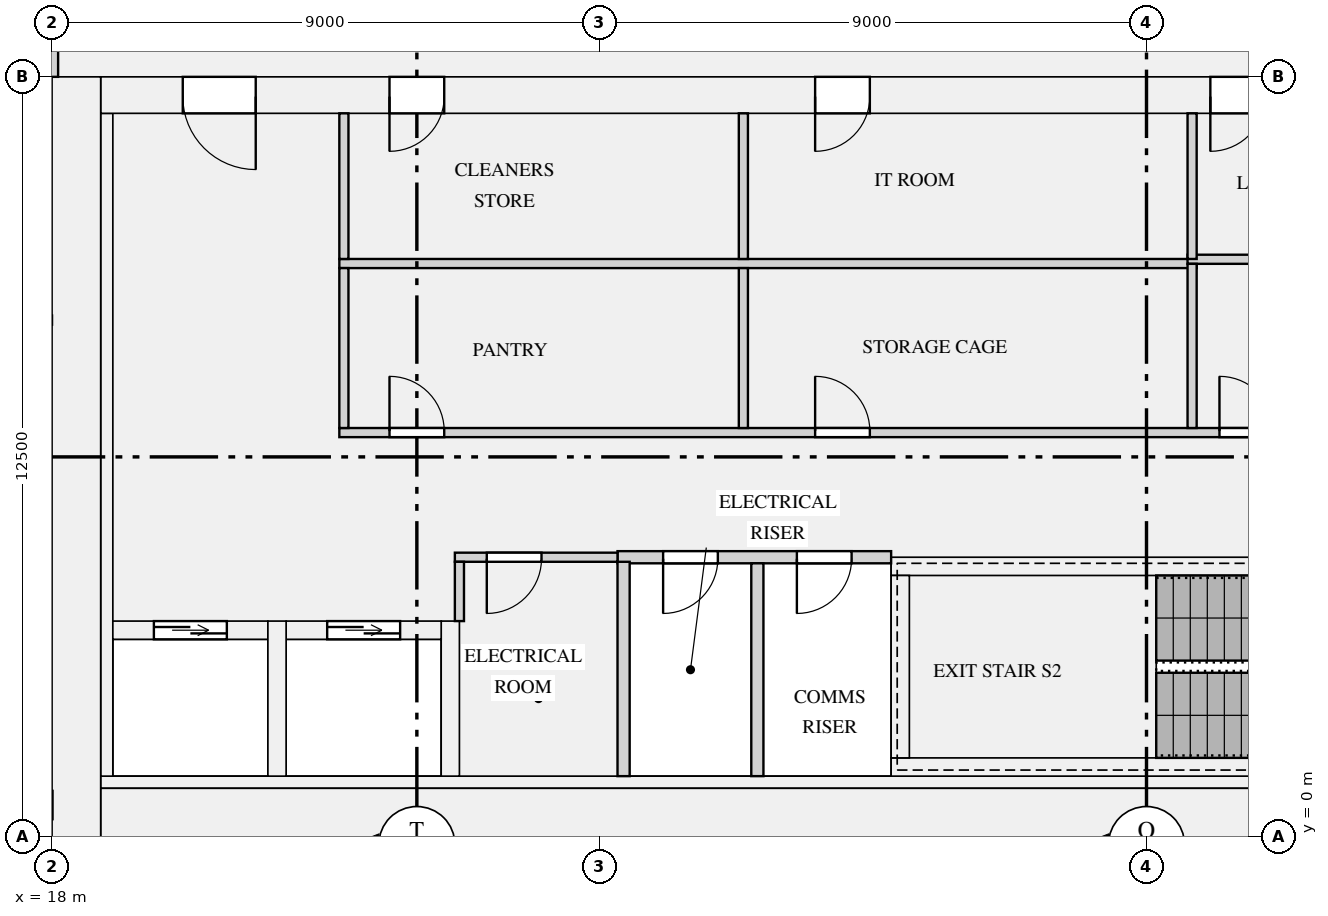
"""IFC4 building model, lengths in metres.
Left out: names, types, materials, properties, quantities, classifications, styles, units other than length and angle.
Written with IfcOpenShell. Run it as: python <this file> out.ifc"""

import sys

from ifc_helpers import new_model, si_unit, direction, frame, frame_2d, origin, place, context, subcontext, project, spatial, rectangle, extrude, element, fill, save


model = new_model("IFC4")
c1 = context("Model", 3, precision=1e-05, world=origin(), true_north=direction((0.0, 1.0)))
c2 = subcontext(c1, "Body", "Model", "MODEL_VIEW")
j1 = project(units=[si_unit("LENGTHUNIT", "METRE"), si_unit("PLANEANGLEUNIT", "RADIAN")], contexts=[c1])
p1 = place(None, origin())
s1 = spatial("IfcSite", under=j1, at=p1, CompositionType="ELEMENT")
p2 = place(p1, origin())
s2 = spatial("IfcBuilding", under=s1, at=p2, CompositionType="ELEMENT")
p3 = place(p2, frame((0.0, 0.0, 124.5)))
s3 = spatial("IfcBuildingStorey", under=s2, at=p3, CompositionType="ELEMENT", Elevation=124.5)
p4 = place(p3, frame((18.4, 0.0, 0.0), z_axis=(0.0, 0.0, 1.0), x_axis=(0.0, 1.0, 0.0)))
e1 = element("IfcWall", 1, at=p4, inside=s3, PredefinedType="SHEAR", context=c2, shape_type="SweptSolid", body=[
    extrude(rectangle(XDim=12.5, YDim=0.8, at=frame_2d((6.25, 0.0))), origin(), (0.0, 0.0, 1.0), 3.15),
])
p5 = place(p3, frame((18.8, 0.4, 0.0), z_axis=(0.0, 0.0, 1.0), x_axis=(1.0, 0.0, 0.0)))
e2 = element("IfcWall", 2, at=p5, inside=s3, PredefinedType="SHEAR", context=c2, shape_type="SweptSolid", body=[
    extrude(rectangle(XDim=34.4, YDim=0.8, at=frame_2d((17.2, 0.0))), origin(), (0.0, 0.0, 1.0), 3.15),
])
p6 = place(p3, frame((18.8, 12.2, 0.0), z_axis=(0.0, 0.0, 1.0), x_axis=(1.0, 0.0, 0.0)))
e3 = element("IfcWall", 3, at=p6, inside=s3, PredefinedType="SHEAR", context=c2, shape_type="SweptSolid", body=[
    extrude(rectangle(XDim=34.4, YDim=0.6, at=frame_2d((17.2, 0.0))), origin(), (0.0, 0.0, 1.0), 3.15),
])
p7 = place(p6, frame((24.375, 0.0, 0.0)))
e4 = element("IfcOpeningElement", 4, at=p7, cuts=e3, PredefinedType="OPENING", context=c2, shape_type="SweptSolid", body=[
    extrude(rectangle(XDim=1.1, YDim=2.1, at=frame_2d((0.55, 1.05))), frame((0.0, 0.31, 0.0), z_axis=(0.0, -1.0, 0.0), x_axis=(1.0, 0.0, 0.0)), (0.0, 0.0, 1.0), 0.62),
])
p8 = place(p6, frame((26.625, 0.0, 0.0)))
e5 = element("IfcOpeningElement", 5, at=p8, cuts=e3, PredefinedType="OPENING", context=c2, shape_type="SweptSolid", body=[
    extrude(rectangle(XDim=1.1, YDim=2.1, at=frame_2d((0.55, 1.05))), frame((0.0, 0.31, 0.0), z_axis=(0.0, -1.0, 0.0), x_axis=(1.0, 0.0, 0.0)), (0.0, 0.0, 1.0), 0.62),
])
p9 = place(p6, frame((28.875, 0.0, 0.0)))
e6 = element("IfcOpeningElement", 6, at=p9, cuts=e3, PredefinedType="OPENING", context=c2, shape_type="SweptSolid", body=[
    extrude(rectangle(XDim=1.1, YDim=2.1, at=frame_2d((0.55, 1.05))), frame((0.0, 0.31, 0.0), z_axis=(0.0, -1.0, 0.0), x_axis=(1.0, 0.0, 0.0)), (0.0, 0.0, 1.0), 0.62),
])
p10 = place(p6, frame((4.75, 0.0, 0.0)))
e7 = element("IfcOpeningElement", 7, at=p10, cuts=e3, PredefinedType="OPENING", context=c2, shape_type="SweptSolid", body=[
    extrude(rectangle(XDim=0.9, YDim=2.1, at=frame_2d((0.45, 1.05))), frame((0.0, 0.31, 0.0), z_axis=(0.0, -1.0, 0.0), x_axis=(1.0, 0.0, 0.0)), (0.0, 0.0, 1.0), 0.62),
])
p11 = place(p6, frame((11.75, 0.0, 0.0)))
e8 = element("IfcOpeningElement", 8, at=p11, cuts=e3, PredefinedType="OPENING", context=c2, shape_type="SweptSolid", body=[
    extrude(rectangle(XDim=0.9, YDim=2.1, at=frame_2d((0.45, 1.05))), frame((0.0, 0.31, 0.0), z_axis=(0.0, -1.0, 0.0), x_axis=(1.0, 0.0, 0.0)), (0.0, 0.0, 1.0), 0.62),
])
p12 = place(p6, frame((18.25, 0.0, 0.0)))
e9 = element("IfcOpeningElement", 9, at=p12, cuts=e3, PredefinedType="OPENING", context=c2, shape_type="SweptSolid", body=[
    extrude(rectangle(XDim=0.9, YDim=2.1, at=frame_2d((0.45, 1.05))), frame((0.0, 0.31, 0.0), z_axis=(0.0, -1.0, 0.0), x_axis=(1.0, 0.0, 0.0)), (0.0, 0.0, 1.0), 0.62),
])
p13 = place(p6, frame((1.35, 0.0, 0.0)))
e10 = element("IfcOpeningElement", 10, at=p13, cuts=e3, PredefinedType="OPENING", context=c2, shape_type="SweptSolid", body=[
    extrude(rectangle(XDim=1.2, YDim=2.1, at=frame_2d((0.6, 1.05))), frame((0.0, 0.31, 0.0), z_axis=(0.0, -1.0, 0.0), x_axis=(1.0, 0.0, 0.0)), (0.0, 0.0, 1.0), 0.62),
])
p14 = place(p6, frame((31.85, 0.0, 0.0)))
e11 = element("IfcOpeningElement", 11, at=p14, cuts=e3, PredefinedType="OPENING", context=c2, shape_type="SweptSolid", body=[
    extrude(rectangle(XDim=1.2, YDim=2.1, at=frame_2d((0.6, 1.05))), frame((0.0, 0.31, 0.0), z_axis=(0.0, -1.0, 0.0), x_axis=(1.0, 0.0, 0.0)), (0.0, 0.0, 1.0), 0.62),
])
p15 = place(p3, frame((18.9, 1.0, 0.0), z_axis=(0.0, 0.0, 1.0), x_axis=(0.0, 1.0, 0.0)))
e12 = element("IfcWall", 12, at=p15, inside=s3, PredefinedType="SHEAR", context=c2, shape_type="SweptSolid", body=[
    extrude(rectangle(XDim=10.9, YDim=0.2, at=frame_2d((5.45, 0.0))), origin(), (0.0, 0.0, 1.0), 3.15),
])
p16 = place(p3, frame((18.8, 0.9, 0.0), z_axis=(0.0, 0.0, 1.0), x_axis=(1.0, 0.0, 0.0)))
e13 = element("IfcWall", 13, at=p16, inside=s3, PredefinedType="SHEAR", context=c2, shape_type="SweptSolid", body=[
    extrude(rectangle(XDim=34.4, YDim=0.2, at=frame_2d((17.2, 0.0))), origin(), (0.0, 0.0, 1.0), 3.15),
])
p17 = place(p3, frame((19.0, 3.4, 0.0), z_axis=(0.0, 0.0, 1.0), x_axis=(1.0, 0.0, 0.0)))
e14 = element("IfcWall", 14, at=p17, inside=s3, PredefinedType="SHEAR", context=c2, shape_type="SweptSolid", body=[
    extrude(rectangle(XDim=2.55, YDim=0.3, at=frame_2d((1.275, 0.0))), origin(), (0.0, 0.0, 1.0), 3.15),
])
p18 = place(p17, frame((0.675, 0.0, 0.0)))
e15 = element("IfcOpeningElement", 15, at=p18, cuts=e14, PredefinedType="OPENING", context=c2, shape_type="SweptSolid", body=[
    extrude(rectangle(XDim=1.2, YDim=2.1, at=frame_2d((0.6, 1.05))), frame((0.0, 0.16, 0.0), z_axis=(0.0, -1.0, 0.0), x_axis=(1.0, 0.0, 0.0)), (0.0, 0.0, 1.0), 0.32),
])
p19 = place(p3, frame((21.85, 3.4, 0.0), z_axis=(0.0, 0.0, 1.0), x_axis=(1.0, 0.0, 0.0)))
e16 = element("IfcWall", 16, at=p19, inside=s3, PredefinedType="SHEAR", context=c2, shape_type="SweptSolid", body=[
    extrude(rectangle(XDim=2.55, YDim=0.3, at=frame_2d((1.275, 0.0))), origin(), (0.0, 0.0, 1.0), 3.15),
])
p20 = place(p19, frame((0.675, 0.0, 0.0)))
e17 = element("IfcOpeningElement", 17, at=p20, cuts=e16, PredefinedType="OPENING", context=c2, shape_type="SweptSolid", body=[
    extrude(rectangle(XDim=1.2, YDim=2.1, at=frame_2d((0.6, 1.05))), frame((0.0, 0.16, 0.0), z_axis=(0.0, -1.0, 0.0), x_axis=(1.0, 0.0, 0.0)), (0.0, 0.0, 1.0), 0.32),
])
for number, where, z_axis, x_axis in (
    (18, (21.7, 1.0, 0.0), (0.0, 0.0, 1.0), (0.0, 1.0, 0.0)),
    (19, (24.55, 1.0, 0.0), (0.0, 0.0, 1.0), (0.0, 1.0, 0.0)),
):
    element("IfcWall", number, at=place(p3, frame(where, z_axis=z_axis, x_axis=x_axis)), inside=s3, PredefinedType="SHEAR", context=c2, shape_type="SweptSolid", body=[
        extrude(rectangle(XDim=2.55, YDim=0.3, at=frame_2d((1.275, 0.0))), origin(), (0.0, 0.0, 1.0), 3.15),
    ])
p21 = place(p3, frame((31.8, 1.15, 0.0), z_axis=(0.0, 0.0, 1.0), x_axis=(1.0, 0.0, 0.0)))
e20 = element("IfcWall", 20, at=p21, inside=s3, PredefinedType="SHEAR", context=c2, shape_type="SweptSolid", body=[
    extrude(rectangle(XDim=8.4, YDim=0.3, at=frame_2d((4.2, 0.0))), origin(), (0.0, 0.0, 1.0), 3.15),
])
p22 = place(p3, frame((31.8, 4.45, 0.0), z_axis=(0.0, 0.0, 1.0), x_axis=(1.0, 0.0, 0.0)))
e21 = element("IfcWall", 21, at=p22, inside=s3, PredefinedType="SHEAR", context=c2, shape_type="SweptSolid", body=[
    extrude(rectangle(XDim=8.4, YDim=0.3, at=frame_2d((4.2, 0.0))), origin(), (0.0, 0.0, 1.0), 3.15),
])
p23 = place(p22, frame((6.8, 0.0, 0.0)))
e22 = element("IfcOpeningElement", 22, at=p23, cuts=e21, PredefinedType="OPENING", context=c2, shape_type="SweptSolid", body=[
    extrude(rectangle(XDim=1.1, YDim=2.1, at=frame_2d((0.55, 1.05))), frame((0.0, 0.16, 0.0), z_axis=(0.0, -1.0, 0.0), x_axis=(1.0, 0.0, 0.0)), (0.0, 0.0, 1.0), 0.32),
])
p24 = place(p3, frame((31.95, 1.3, 0.0), z_axis=(0.0, 0.0, 1.0), x_axis=(0.0, 1.0, 0.0)))
e23 = element("IfcWall", 23, at=p24, inside=s3, PredefinedType="SHEAR", context=c2, shape_type="SweptSolid", body=[
    extrude(rectangle(XDim=3.0, YDim=0.3, at=frame_2d((1.5, 0.0))), origin(), (0.0, 0.0, 1.0), 3.15),
])
p25 = place(p3, frame((14.05, 0.525, 0.9), z_axis=(0.0, 0.0, 1.0), x_axis=(1.0, 0.0, 0.0)))
e24 = element("IfcWall", 24, at=p25, inside=s3, PredefinedType="SOLIDWALL", context=c2, shape_type="SweptSolid", body=[
    extrude(rectangle(XDim=3.95, YDim=0.45, at=frame_2d((1.975, 0.0))), origin(), (0.0, 0.0, 1.0), 1.93),
])
p26 = place(p25, frame((1.225, 0.0, 0.15)))
e25 = element("IfcOpeningElement", 25, at=p26, cuts=e24, PredefinedType="OPENING", context=c2, shape_type="SweptSolid", body=[
    extrude(rectangle(XDim=1.5, YDim=1.5, at=frame_2d((0.75, 0.75))), frame((0.0, 0.235, 0.0), z_axis=(0.0, -1.0, 0.0), x_axis=(1.0, 0.0, 0.0)), (0.0, 0.0, 1.0), 0.47),
])
p27 = place(p3, frame((27.3, 4.6, 0.0), z_axis=(0.0, 0.0, 1.0), x_axis=(1.0, 0.0, 0.0)))
e26 = element("IfcWall", 26, at=p27, inside=s3, PredefinedType="PARTITIONING", context=c2, shape_type="SweptSolid", body=[
    extrude(rectangle(XDim=4.5, YDim=0.2, at=frame_2d((2.25, 0.0))), origin(), (0.0, 0.0, 1.0), 2.83),
])
p28 = place(p27, frame((0.75, 0.0, 0.0)))
e27 = element("IfcOpeningElement", 27, at=p28, cuts=e26, PredefinedType="OPENING", context=c2, shape_type="SweptSolid", body=[
    extrude(rectangle(XDim=0.9, YDim=2.1, at=frame_2d((0.45, 1.05))), frame((0.0, 0.11, 0.0), z_axis=(0.0, -1.0, 0.0), x_axis=(1.0, 0.0, 0.0)), (0.0, 0.0, 1.0), 0.22),
])
p29 = place(p27, frame((2.95, 0.0, 0.0)))
e28 = element("IfcOpeningElement", 28, at=p29, cuts=e26, PredefinedType="OPENING", context=c2, shape_type="SweptSolid", body=[
    extrude(rectangle(XDim=0.9, YDim=2.1, at=frame_2d((0.45, 1.05))), frame((0.0, 0.11, 0.0), z_axis=(0.0, -1.0, 0.0), x_axis=(1.0, 0.0, 0.0)), (0.0, 0.0, 1.0), 0.22),
])
p30 = place(p3, frame((24.625, 4.6, 0.0), z_axis=(0.0, 0.0, 1.0), x_axis=(1.0, 0.0, 0.0)))
e29 = element("IfcWall", 29, at=p30, inside=s3, PredefinedType="PARTITIONING", context=c2, shape_type="SweptSolid", body=[
    extrude(rectangle(XDim=2.675, YDim=0.15, at=frame_2d((1.337, 0.0))), origin(), (0.0, 0.0, 1.0), 2.83),
])
p31 = place(p30, frame((0.525, 0.0, 0.0)))
e30 = element("IfcOpeningElement", 30, at=p31, cuts=e29, PredefinedType="OPENING", context=c2, shape_type="SweptSolid", body=[
    extrude(rectangle(XDim=0.9, YDim=2.1, at=frame_2d((0.45, 1.05))), frame((0.0, 0.085, 0.0), z_axis=(0.0, -1.0, 0.0), x_axis=(1.0, 0.0, 0.0)), (0.0, 0.0, 1.0), 0.17),
])
p32 = place(p3, frame((22.725, 6.65, 0.0), z_axis=(0.0, 0.0, 1.0), x_axis=(1.0, 0.0, 0.0)))
e31 = element("IfcWall", 31, at=p32, inside=s3, PredefinedType="PARTITIONING", context=c2, shape_type="SweptSolid", body=[
    extrude(rectangle(XDim=19.8, YDim=0.15, at=frame_2d((9.9, 0.0))), origin(), (0.0, 0.0, 1.0), 2.83),
])
p33 = place(p32, frame((0.825, 0.0, 0.0)))
e32 = element("IfcOpeningElement", 32, at=p33, cuts=e31, PredefinedType="OPENING", context=c2, shape_type="SweptSolid", body=[
    extrude(rectangle(XDim=0.9, YDim=2.1, at=frame_2d((0.45, 1.05))), frame((0.0, 0.085, 0.0), z_axis=(0.0, -1.0, 0.0), x_axis=(1.0, 0.0, 0.0)), (0.0, 0.0, 1.0), 0.17),
])
p34 = place(p32, frame((7.825, 0.0, 0.0)))
e33 = element("IfcOpeningElement", 33, at=p34, cuts=e31, PredefinedType="OPENING", context=c2, shape_type="SweptSolid", body=[
    extrude(rectangle(XDim=0.9, YDim=2.1, at=frame_2d((0.45, 1.05))), frame((0.0, 0.085, 0.0), z_axis=(0.0, -1.0, 0.0), x_axis=(1.0, 0.0, 0.0)), (0.0, 0.0, 1.0), 0.17),
])
p35 = place(p32, frame((14.475, 0.0, 0.0)))
e34 = element("IfcOpeningElement", 34, at=p35, cuts=e31, PredefinedType="OPENING", context=c2, shape_type="SweptSolid", body=[
    extrude(rectangle(XDim=0.9, YDim=2.1, at=frame_2d((0.45, 1.05))), frame((0.0, 0.085, 0.0), z_axis=(0.0, -1.0, 0.0), x_axis=(1.0, 0.0, 0.0)), (0.0, 0.0, 1.0), 0.17),
])
p36 = place(p3, frame((22.725, 9.43, 0.0), z_axis=(0.0, 0.0, 1.0), x_axis=(1.0, 0.0, 0.0)))
e35 = element("IfcWall", 35, at=p36, inside=s3, PredefinedType="PARTITIONING", context=c2, shape_type="SweptSolid", body=[
    extrude(rectangle(XDim=14.1, YDim=0.15, at=frame_2d((7.05, 0.0))), origin(), (0.0, 0.0, 1.0), 2.83),
])
p37 = place(p3, frame((36.675, 9.5, 0.0), z_axis=(0.0, 0.0, 1.0), x_axis=(1.0, 0.0, 0.0)))
e36 = element("IfcWall", 36, at=p37, inside=s3, PredefinedType="PARTITIONING", context=c2, shape_type="SweptSolid", body=[
    extrude(rectangle(XDim=5.775, YDim=0.15, at=frame_2d((2.887, 0.0))), origin(), (0.0, 0.0, 1.0), 2.83),
])
p38 = place(p3, frame((27.4, 1.0, 0.0), z_axis=(0.0, 0.0, 1.0), x_axis=(0.0, 1.0, 0.0)))
e37 = element("IfcWall", 37, at=p38, inside=s3, PredefinedType="PARTITIONING", context=c2, shape_type="SweptSolid", body=[
    extrude(rectangle(XDim=3.525, YDim=0.2, at=frame_2d((1.762, 0.0))), origin(), (0.0, 0.0, 1.0), 2.83),
])
p39 = place(p3, frame((29.6, 1.0, 0.0), z_axis=(0.0, 0.0, 1.0), x_axis=(0.0, 1.0, 0.0)))
e38 = element("IfcWall", 38, at=p39, inside=s3, PredefinedType="PARTITIONING", context=c2, shape_type="SweptSolid", body=[
    extrude(rectangle(XDim=3.5, YDim=0.2, at=frame_2d((1.75, 0.0))), origin(), (0.0, 0.0, 1.0), 2.83),
])
p40 = place(p3, frame((24.7, 3.55, 0.0), z_axis=(0.0, 0.0, 1.0), x_axis=(0.0, 1.0, 0.0)))
e39 = element("IfcWall", 39, at=p40, inside=s3, PredefinedType="PARTITIONING", context=c2, shape_type="SweptSolid", body=[
    extrude(rectangle(XDim=0.975, YDim=0.15, at=frame_2d((0.487, 0.0))), origin(), (0.0, 0.0, 1.0), 2.83),
])
for number, where, z_axis, x_axis in (
    (40, (22.8, 6.725, 0.0), (0.0, 0.0, 1.0), (0.0, 1.0, 0.0)),
    (41, (29.37, 6.725, 0.0), (0.0, 0.0, 1.0), (0.0, 1.0, 0.0)),
):
    element("IfcWall", number, at=place(p3, frame(where, z_axis=z_axis, x_axis=x_axis)), inside=s3, PredefinedType="PARTITIONING", context=c2, shape_type="SweptSolid", body=[
        extrude(rectangle(XDim=2.63, YDim=0.15, at=frame_2d((1.315, 0.0))), origin(), (0.0, 0.0, 1.0), 2.83),
    ])
p41 = place(p3, frame((36.75, 6.725, 0.0), z_axis=(0.0, 0.0, 1.0), x_axis=(0.0, 1.0, 0.0)))
e42 = element("IfcWall", 42, at=p41, inside=s3, PredefinedType="PARTITIONING", context=c2, shape_type="SweptSolid", body=[
    extrude(rectangle(XDim=2.7, YDim=0.15, at=frame_2d((1.35, 0.0))), origin(), (0.0, 0.0, 1.0), 2.83),
])
for number, where, z_axis, x_axis in (
    (43, (22.8, 9.505, 0.0), (0.0, 0.0, 1.0), (0.0, 1.0, 0.0)),
    (44, (29.37, 9.505, 0.0), (0.0, 0.0, 1.0), (0.0, 1.0, 0.0)),
    (45, (36.75, 9.505, 0.0), (0.0, 0.0, 1.0), (0.0, 1.0, 0.0)),
):
    element("IfcWall", number, at=place(p3, frame(where, z_axis=z_axis, x_axis=x_axis)), inside=s3, PredefinedType="PARTITIONING", context=c2, shape_type="SweptSolid", body=[
        extrude(rectangle(XDim=2.395, YDim=0.15, at=frame_2d((1.198, 0.0))), origin(), (0.0, 0.0, 1.0), 2.83),
    ])
p42 = place(p3, frame((18.0, 12.5, 0.0), z_axis=(0.0, 0.0, 1.0), x_axis=(0.0, 1.0, 0.0)))
e46 = element("IfcWall", 46, at=p42, inside=s3, PredefinedType="PARTITIONING", context=c2, shape_type="SweptSolid", body=[
    extrude(rectangle(XDim=3.4, YDim=0.2, at=frame_2d((1.7, 0.0))), origin(), (0.0, 0.0, 1.0), 2.83),
])
p43 = place(p18, origin())
e47 = element("IfcDoor", 47, at=p43, inside=s3, OperationType="DOUBLE_DOOR_SLIDING", PredefinedType="DOOR", context=c2, shape_type="SweptSolid", body=[
    extrude(rectangle(XDim=1.2, YDim=2.1, at=frame_2d((0.6, 1.05))), frame((0.0, 0.025, 0.0), z_axis=(0.0, -1.0, 0.0), x_axis=(1.0, 0.0, 0.0)), (0.0, 0.0, 1.0), 0.05),
])
fill(e15, e47)
p44 = place(p20, origin())
e48 = element("IfcDoor", 48, at=p44, inside=s3, OperationType="DOUBLE_DOOR_SLIDING", PredefinedType="DOOR", context=c2, shape_type="SweptSolid", body=[
    extrude(rectangle(XDim=1.2, YDim=2.1, at=frame_2d((0.6, 1.05))), frame((0.0, 0.025, 0.0), z_axis=(0.0, -1.0, 0.0), x_axis=(1.0, 0.0, 0.0)), (0.0, 0.0, 1.0), 0.05),
])
fill(e17, e48)
p45 = place(p31, frame((0.9, 0.0, 0.0), z_axis=(0.0, 0.0, 1.0), x_axis=(-1.0, 0.0, 0.0)))
e49 = element("IfcDoor", 49, at=p45, inside=s3, OperationType="SINGLE_SWING_RIGHT", PredefinedType="DOOR", context=c2, shape_type="SweptSolid", body=[
    extrude(rectangle(XDim=0.9, YDim=2.1, at=frame_2d((0.45, 1.05))), frame((0.0, 0.025, 0.0), z_axis=(0.0, -1.0, 0.0), x_axis=(1.0, 0.0, 0.0)), (0.0, 0.0, 1.0), 0.05),
])
fill(e30, e49)
p46 = place(p33, origin())
e50 = element("IfcDoor", 50, at=p46, inside=s3, OperationType="SINGLE_SWING_LEFT", PredefinedType="DOOR", context=c2, shape_type="SweptSolid", body=[
    extrude(rectangle(XDim=0.9, YDim=2.1, at=frame_2d((0.45, 1.05))), frame((0.0, 0.025, 0.0), z_axis=(0.0, -1.0, 0.0), x_axis=(1.0, 0.0, 0.0)), (0.0, 0.0, 1.0), 0.05),
])
fill(e32, e50)
p47 = place(p34, origin())
e51 = element("IfcDoor", 51, at=p47, inside=s3, OperationType="SINGLE_SWING_LEFT", PredefinedType="DOOR", context=c2, shape_type="SweptSolid", body=[
    extrude(rectangle(XDim=0.9, YDim=2.1, at=frame_2d((0.45, 1.05))), frame((0.0, 0.025, 0.0), z_axis=(0.0, -1.0, 0.0), x_axis=(1.0, 0.0, 0.0)), (0.0, 0.0, 1.0), 0.05),
])
fill(e33, e51)
p48 = place(p10, frame((0.9, 0.0, 0.0), z_axis=(0.0, 0.0, 1.0), x_axis=(-1.0, 0.0, 0.0)))
e52 = element("IfcDoor", 52, at=p48, inside=s3, OperationType="SINGLE_SWING_RIGHT", PredefinedType="DOOR", context=c2, shape_type="SweptSolid", body=[
    extrude(rectangle(XDim=0.9, YDim=2.1, at=frame_2d((0.45, 1.05))), frame((0.0, 0.025, 0.0), z_axis=(0.0, -1.0, 0.0), x_axis=(1.0, 0.0, 0.0)), (0.0, 0.0, 1.0), 0.05),
])
fill(e7, e52)
p49 = place(p11, frame((0.9, 0.0, 0.0), z_axis=(0.0, 0.0, 1.0), x_axis=(-1.0, 0.0, 0.0)))
e53 = element("IfcDoor", 53, at=p49, inside=s3, OperationType="SINGLE_SWING_RIGHT", PredefinedType="DOOR", context=c2, shape_type="SweptSolid", body=[
    extrude(rectangle(XDim=0.9, YDim=2.1, at=frame_2d((0.45, 1.05))), frame((0.0, 0.025, 0.0), z_axis=(0.0, -1.0, 0.0), x_axis=(1.0, 0.0, 0.0)), (0.0, 0.0, 1.0), 0.05),
])
fill(e8, e53)
p50 = place(p35, origin())
e54 = element("IfcDoor", 54, at=p50, inside=s3, OperationType="SINGLE_SWING_LEFT", PredefinedType="DOOR", context=c2, shape_type="SweptSolid", body=[
    extrude(rectangle(XDim=0.9, YDim=2.1, at=frame_2d((0.45, 1.05))), frame((0.0, 0.025, 0.0), z_axis=(0.0, -1.0, 0.0), x_axis=(1.0, 0.0, 0.0)), (0.0, 0.0, 1.0), 0.05),
])
fill(e34, e54)
p51 = place(p12, frame((0.9, 0.0, 0.0), z_axis=(0.0, 0.0, 1.0), x_axis=(-1.0, 0.0, 0.0)))
e55 = element("IfcDoor", 55, at=p51, inside=s3, OperationType="SINGLE_SWING_RIGHT", PredefinedType="DOOR", context=c2, shape_type="SweptSolid", body=[
    extrude(rectangle(XDim=0.9, YDim=2.1, at=frame_2d((0.45, 1.05))), frame((0.0, 0.025, 0.0), z_axis=(0.0, -1.0, 0.0), x_axis=(1.0, 0.0, 0.0)), (0.0, 0.0, 1.0), 0.05),
])
fill(e9, e55)
p52 = place(p28, frame((0.9, 0.0, 0.0), z_axis=(0.0, 0.0, 1.0), x_axis=(-1.0, 0.0, 0.0)))
e56 = element("IfcDoor", 56, at=p52, inside=s3, OperationType="SINGLE_SWING_RIGHT", PredefinedType="DOOR", context=c2, shape_type="SweptSolid", body=[
    extrude(rectangle(XDim=0.9, YDim=2.1, at=frame_2d((0.45, 1.05))), frame((0.0, 0.025, 0.0), z_axis=(0.0, -1.0, 0.0), x_axis=(1.0, 0.0, 0.0)), (0.0, 0.0, 1.0), 0.05),
])
fill(e27, e56)
p53 = place(p29, frame((0.9, 0.0, 0.0), z_axis=(0.0, 0.0, 1.0), x_axis=(-1.0, 0.0, 0.0)))
e57 = element("IfcDoor", 57, at=p53, inside=s3, OperationType="SINGLE_SWING_RIGHT", PredefinedType="DOOR", context=c2, shape_type="SweptSolid", body=[
    extrude(rectangle(XDim=0.9, YDim=2.1, at=frame_2d((0.45, 1.05))), frame((0.0, 0.025, 0.0), z_axis=(0.0, -1.0, 0.0), x_axis=(1.0, 0.0, 0.0)), (0.0, 0.0, 1.0), 0.05),
])
fill(e28, e57)
p54 = place(p13, frame((1.2, 0.0, 0.0), z_axis=(0.0, 0.0, 1.0), x_axis=(-1.0, 0.0, 0.0)))
e58 = element("IfcDoor", 58, at=p54, inside=s3, OperationType="SINGLE_SWING_LEFT", PredefinedType="DOOR", context=c2, shape_type="SweptSolid", body=[
    extrude(rectangle(XDim=1.2, YDim=2.1, at=frame_2d((0.6, 1.05))), frame((0.0, 0.025, 0.0), z_axis=(0.0, -1.0, 0.0), x_axis=(1.0, 0.0, 0.0)), (0.0, 0.0, 1.0), 0.05),
])
fill(e10, e58)
save(model, sys.argv[1])
